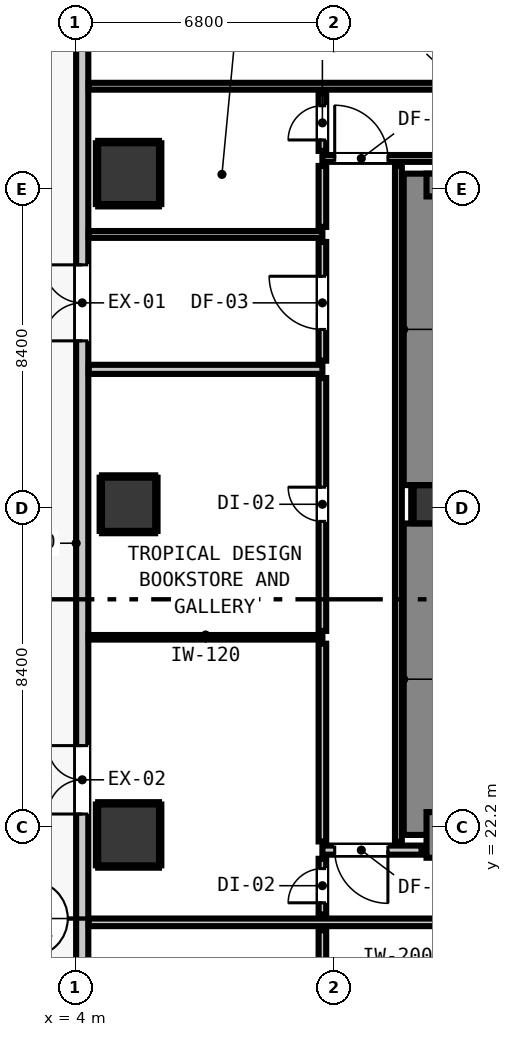
"""IFC4 building model, lengths in metres.
Left out: names, types, materials, properties, quantities, classifications, styles, units other than length and angle.
Written with IfcOpenShell. Run it as: python <this file> out.ifc"""

import sys

from ifc_helpers import new_model, si_unit, direction, frame, frame_2d, origin, origin_2d, place, context, subcontext, project, spatial, rectangle, extrude, element, fill, save


model = new_model("IFC4")
c1 = context("Model", 3, precision=1e-05, world=origin(), true_north=direction((0.0, 1.0)))
c2 = subcontext(c1, "Body", "Model", "MODEL_VIEW")
j1 = project(units=[si_unit("LENGTHUNIT", "METRE"), si_unit("PLANEANGLEUNIT", "RADIAN")], contexts=[c1])
p1 = place(None, origin())
s1 = spatial("IfcSite", under=j1, at=p1, CompositionType="ELEMENT")
p2 = place(p1, origin())
s2 = spatial("IfcBuilding", under=s1, at=p2, CompositionType="ELEMENT")
p3 = place(p2, origin())
s3 = spatial("IfcBuildingStorey", under=s2, at=p3, CompositionType="ELEMENT", Elevation=0.0)
p4 = place(p3, frame((13.4, 30.7, 0.0), z_axis=(0.0, 0.0, 1.0), x_axis=(1.0, 0.0, 0.0)))
e1 = element("IfcColumn", 1, at=p4, inside=s3, PredefinedType="COLUMN", context=c2, shape_type="SweptSolid", body=[
    extrude(rectangle(XDim=1.0, YDim=1.0, at=origin_2d()), origin(), (0.0, 0.0, 1.0), 5.2),
])
p5 = place(p3, frame((13.24, 22.0, 0.0), z_axis=(0.0, 0.0, 1.0), x_axis=(0.0, 1.0, 0.0)))
e2 = element("IfcWall", 2, at=p5, inside=s3, PredefinedType="SHEAR", context=c2, shape_type="SweptSolid", body=[
    extrude(rectangle(XDim=8.195, YDim=1.2, at=frame_2d((4.098, 0.0))), origin(), (0.0, 0.0, 1.0), 5.2),
])
p6 = place(p3, frame((13.24, 31.205, 0.0), z_axis=(0.0, 0.0, 1.0), x_axis=(0.0, 1.0, 0.0)))
e3 = element("IfcWall", 3, at=p6, inside=s3, PredefinedType="SHEAR", context=c2, shape_type="SweptSolid", body=[
    extrude(rectangle(XDim=8.195, YDim=1.2, at=frame_2d((4.097, 0.0))), origin(), (0.0, 0.0, 1.0), 5.2),
])
p7 = place(p3, frame((13.24, 22.0, 0.0), z_axis=(0.0, 0.0, 1.0), x_axis=(1.0, 0.0, 0.0)))
e4 = element("IfcWall", 4, at=p7, inside=s3, PredefinedType="SHEAR", context=c2, shape_type="SweptSolid", body=[
    extrude(rectangle(XDim=4.08, YDim=1.2, at=frame_2d((2.04, 0.0))), origin(), (0.0, 0.0, 1.0), 5.2),
])
p8 = place(p3, frame((13.24, 39.1, 0.0), z_axis=(0.0, 0.0, 1.0), x_axis=(1.0, 0.0, 0.0)))
e5 = element("IfcWall", 5, at=p8, inside=s3, PredefinedType="SHEAR", context=c2, shape_type="SweptSolid", body=[
    extrude(rectangle(XDim=4.08, YDim=0.6, at=frame_2d((2.04, 0.0))), origin(), (0.0, 0.0, 1.0), 5.2),
])
p9 = place(p3, frame((5.4, 22.0, 0.0), z_axis=(0.0, 0.0, 1.0), x_axis=(1.0, 0.0, 0.0)))
e6 = element("IfcColumn", 6, at=p9, inside=s3, PredefinedType="COLUMN", context=c2, shape_type="SweptSolid", body=[
    extrude(rectangle(XDim=1.6, YDim=1.6, at=origin_2d()), origin(), (0.0, 0.0, 1.0), 5.2),
])
p10 = place(p3, frame((5.4, 30.7, 0.0), z_axis=(0.0, 0.0, 1.0), x_axis=(1.0, 0.0, 0.0)))
e7 = element("IfcColumn", 7, at=p10, inside=s3, PredefinedType="COLUMN", context=c2, shape_type="SweptSolid", body=[
    extrude(rectangle(XDim=1.4, YDim=1.4, at=origin_2d()), origin(), (0.0, 0.0, 1.0), 5.2),
])
p11 = place(p3, frame((5.4, 39.4, 0.0), z_axis=(0.0, 0.0, 1.0), x_axis=(1.0, 0.0, 0.0)))
e8 = element("IfcColumn", 8, at=p11, inside=s3, PredefinedType="COLUMN", context=c2, shape_type="SweptSolid", body=[
    extrude(rectangle(XDim=1.6, YDim=1.6, at=origin_2d()), origin(), (0.0, 0.0, 1.0), 5.2),
])
p12 = place(p3, frame((4.18, 12.68, 0.0), z_axis=(0.0, 0.0, 1.0), x_axis=(0.0, 1.0, 0.0)))
e9 = element("IfcWall", 9, at=p12, inside=s3, PredefinedType="STANDARD", context=c2, shape_type="SweptSolid", body=[
    extrude(rectangle(XDim=35.84, YDim=0.32, at=frame_2d((17.92, 0.0))), origin(), (0.0, 0.0, 1.0), 4.92),
])
p13 = place(p12, frame((9.87, 0.0, 0.0)))
e10 = element("IfcOpeningElement", 10, at=p13, cuts=e9, PredefinedType="OPENING", context=c2, shape_type="SweptSolid", body=[
    extrude(rectangle(XDim=1.8, YDim=2.4, at=frame_2d((0.9, 1.2))), frame((0.0, 0.17, 0.0), z_axis=(0.0, -1.0, 0.0), x_axis=(1.0, 0.0, 0.0)), (0.0, 0.0, 1.0), 0.34),
])
p14 = place(p12, frame((22.32, 0.0, 0.0)))
e11 = element("IfcOpeningElement", 11, at=p14, cuts=e9, PredefinedType="OPENING", context=c2, shape_type="SweptSolid", body=[
    extrude(rectangle(XDim=2.0, YDim=2.4, at=frame_2d((1.0, 1.2))), frame((0.0, 0.17, 0.0), z_axis=(0.0, -1.0, 0.0), x_axis=(1.0, 0.0, 0.0)), (0.0, 0.0, 1.0), 0.34),
])
p15 = place(p12, frame((30.72, 0.0, 0.0)))
e12 = element("IfcOpeningElement", 12, at=p15, cuts=e9, PredefinedType="OPENING", context=c2, shape_type="SweptSolid", body=[
    extrude(rectangle(XDim=3.6, YDim=2.8, at=frame_2d((1.8, 1.4))), frame((0.0, 0.17, 0.0), z_axis=(0.0, -1.0, 0.0), x_axis=(1.0, 0.0, 0.0)), (0.0, 0.0, 1.0), 0.34),
])
p16 = place(p12, frame((2.6, 0.0, 0.9)))
e13 = element("IfcOpeningElement", 13, at=p16, cuts=e9, PredefinedType="OPENING", context=c2, shape_type="SweptSolid", body=[
    extrude(rectangle(XDim=2.1, YDim=1.9, at=frame_2d((1.05, 0.95))), frame((0.0, 0.17, 0.0), z_axis=(0.0, -1.0, 0.0), x_axis=(1.0, 0.0, 0.0)), (0.0, 0.0, 1.0), 0.34),
])
p17 = place(p3, frame((13.11, 21.6, 0.0), z_axis=(0.0, 0.0, 1.0), x_axis=(-1.0, 0.0, 0.0)))
e14 = element("IfcWall", 14, at=p17, inside=s3, PredefinedType="PARTITIONING", context=c2, shape_type="SweptSolid", body=[
    extrude(rectangle(XDim=2.61, YDim=0.24, at=frame_2d((1.305, 0.0))), origin(), (0.0, 0.0, 1.0), 4.155),
])
p18 = place(p17, frame((0.886, 0.0, 0.0)))
e15 = element("IfcOpeningElement", 15, at=p18, cuts=e14, PredefinedType="OPENING", context=c2, shape_type="SweptSolid", body=[
    extrude(rectangle(XDim=1.4, YDim=2.15, at=frame_2d((0.7, 1.075))), frame((0.0, 0.13, 0.0), z_axis=(0.0, -1.0, 0.0), x_axis=(1.0, 0.0, 0.0)), (0.0, 0.0, 1.0), 0.26),
])
p19 = place(p3, frame((4.352, 34.25, 0.0), z_axis=(0.0, 0.0, 1.0), x_axis=(1.0, 0.0, 0.0)))
e16 = element("IfcWall", 16, at=p19, inside=s3, PredefinedType="PARTITIONING", context=c2, shape_type="SweptSolid", body=[
    extrude(rectangle(XDim=6.148, YDim=0.24, at=frame_2d((3.074, 0.0))), origin(), (0.0, 0.0, 1.0), 4.92),
])
p20 = place(p3, frame((4.352, 19.7, 0.0), z_axis=(0.0, 0.0, 1.0), x_axis=(1.0, 0.0, 0.0)))
e17 = element("IfcWall", 17, at=p20, inside=s3, PredefinedType="PARTITIONING", context=c2, shape_type="SweptSolid", body=[
    extrude(rectangle(XDim=43.296, YDim=0.2, at=frame_2d((21.648, 0.0))), origin(), (0.0, 0.0, 1.0), 4.92),
])
p21 = place(p20, frame((19.823, 0.0, 0.0)))
e18 = element("IfcOpeningElement", 18, at=p21, cuts=e17, PredefinedType="OPENING", context=c2, shape_type="SweptSolid", body=[
    extrude(rectangle(XDim=1.4, YDim=2.15, at=frame_2d((0.7, 1.075))), frame((0.0, 0.11, 0.0), z_axis=(0.0, -1.0, 0.0), x_axis=(1.0, 0.0, 0.0)), (0.0, 0.0, 1.0), 0.22),
])
p22 = place(p20, frame((36.848, 0.0, 0.0)))
e19 = element("IfcOpeningElement", 19, at=p22, cuts=e17, PredefinedType="OPENING", context=c2, shape_type="SweptSolid", body=[
    extrude(rectangle(XDim=1.4, YDim=2.15, at=frame_2d((0.7, 1.075))), frame((0.0, 0.11, 0.0), z_axis=(0.0, -1.0, 0.0), x_axis=(1.0, 0.0, 0.0)), (0.0, 0.0, 1.0), 0.22),
])
p23 = place(p3, frame((4.352, 37.8, 0.0), z_axis=(0.0, 0.0, 1.0), x_axis=(1.0, 0.0, 0.0)))
e20 = element("IfcWall", 20, at=p23, inside=s3, PredefinedType="PARTITIONING", context=c2, shape_type="SweptSolid", body=[
    extrude(rectangle(XDim=6.148, YDim=0.18, at=frame_2d((3.074, 0.0))), origin(), (0.0, 0.0, 1.0), 4.92),
])
p24 = place(p3, frame((10.5, 39.8, 0.0), z_axis=(0.0, 0.0, 1.0), x_axis=(1.0, 0.0, 0.0)))
e21 = element("IfcWall", 21, at=p24, inside=s3, PredefinedType="PARTITIONING", context=c2, shape_type="SweptSolid", body=[
    extrude(rectangle(XDim=9.698, YDim=0.18, at=frame_2d((4.849, 0.0))), origin(), (0.0, 0.0, 1.0), 4.155),
])
p25 = place(p24, frame((6.935, 0.0, 0.0)))
e22 = element("IfcOpeningElement", 22, at=p25, cuts=e21, PredefinedType="OPENING", context=c2, shape_type="SweptSolid", body=[
    extrude(rectangle(XDim=1.4, YDim=2.15, at=frame_2d((0.7, 1.075))), frame((0.0, 0.1, 0.0), z_axis=(0.0, -1.0, 0.0), x_axis=(1.0, 0.0, 0.0)), (0.0, 0.0, 1.0), 0.2),
])
p26 = place(p24, frame((0.324, 0.0, 0.0)))
e23 = element("IfcOpeningElement", 23, at=p26, cuts=e21, PredefinedType="OPENING", context=c2, shape_type="SweptSolid", body=[
    extrude(rectangle(XDim=1.4, YDim=2.15, at=frame_2d((0.7, 1.075))), frame((0.0, 0.1, 0.0), z_axis=(0.0, -1.0, 0.0), x_axis=(1.0, 0.0, 0.0)), (0.0, 0.0, 1.0), 0.2),
])
p27 = place(p3, frame((4.352, 41.7, 0.0), z_axis=(0.0, 0.0, 1.0), x_axis=(1.0, 0.0, 0.0)))
e24 = element("IfcWall", 24, at=p27, inside=s3, PredefinedType="PARTITIONING", context=c2, shape_type="SweptSolid", body=[
    extrude(rectangle(XDim=34.848, YDim=0.18, at=frame_2d((17.424, 0.0))), origin(), (0.0, 0.0, 1.0), 4.92),
])
p28 = place(p27, frame((18.448, 0.0, 0.0)))
e25 = element("IfcOpeningElement", 25, at=p28, cuts=e24, PredefinedType="OPENING", context=c2, shape_type="SweptSolid", body=[
    extrude(rectangle(XDim=1.4, YDim=2.15, at=frame_2d((0.7, 1.075))), frame((0.0, 0.1, 0.0), z_axis=(0.0, -1.0, 0.0), x_axis=(1.0, 0.0, 0.0)), (0.0, 0.0, 1.0), 0.2),
])
p29 = place(p27, frame((9.258, 0.0, 0.0)))
e26 = element("IfcOpeningElement", 26, at=p29, cuts=e24, PredefinedType="OPENING", context=c2, shape_type="SweptSolid", body=[
    extrude(rectangle(XDim=0.9, YDim=2.1, at=frame_2d((0.45, 1.05))), frame((0.0, 0.1, 0.0), z_axis=(0.0, -1.0, 0.0), x_axis=(1.0, 0.0, 0.0)), (0.0, 0.0, 1.0), 0.2),
])
p30 = place(p27, frame((14.898, 0.0, 0.0)))
e27 = element("IfcOpeningElement", 27, at=p30, cuts=e24, PredefinedType="OPENING", context=c2, shape_type="SweptSolid", body=[
    extrude(rectangle(XDim=0.9, YDim=2.1, at=frame_2d((0.45, 1.05))), frame((0.0, 0.1, 0.0), z_axis=(0.0, -1.0, 0.0), x_axis=(1.0, 0.0, 0.0)), (0.0, 0.0, 1.0), 0.2),
])
p31 = place(p27, frame((22.818, 0.0, 0.0)))
e28 = element("IfcOpeningElement", 28, at=p31, cuts=e24, PredefinedType="OPENING", context=c2, shape_type="SweptSolid", body=[
    extrude(rectangle(XDim=0.86, YDim=2.02, at=frame_2d((0.43, 1.01))), frame((0.0, 0.1, 0.0), z_axis=(0.0, -1.0, 0.0), x_axis=(1.0, 0.0, 0.0)), (0.0, 0.0, 1.0), 0.2),
])
p32 = place(p27, frame((27.518, 0.0, 0.0)))
e29 = element("IfcOpeningElement", 29, at=p32, cuts=e24, PredefinedType="OPENING", context=c2, shape_type="SweptSolid", body=[
    extrude(rectangle(XDim=0.86, YDim=2.02, at=frame_2d((0.43, 1.01))), frame((0.0, 0.1, 0.0), z_axis=(0.0, -1.0, 0.0), x_axis=(1.0, 0.0, 0.0)), (0.0, 0.0, 1.0), 0.2),
])
p33 = place(p27, frame((32.049, 0.0, 0.0)))
e30 = element("IfcOpeningElement", 30, at=p33, cuts=e24, PredefinedType="OPENING", context=c2, shape_type="SweptSolid", body=[
    extrude(rectangle(XDim=0.95, YDim=2.1, at=frame_2d((0.475, 1.05))), frame((0.0, 0.1, 0.0), z_axis=(0.0, -1.0, 0.0), x_axis=(1.0, 0.0, 0.0)), (0.0, 0.0, 1.0), 0.2),
])
p34 = place(p3, frame((4.352, 27.2, 0.0), z_axis=(0.0, 0.0, 1.0), x_axis=(1.0, 0.0, 0.0)))
e31 = element("IfcWall", 31, at=p34, inside=s3, PredefinedType="PARTITIONING", context=c2, shape_type="SweptSolid", body=[
    extrude(rectangle(XDim=6.148, YDim=0.12, at=frame_2d((3.074, 0.0))), origin(), (0.0, 0.0, 1.0), 4.92),
])
p35 = place(p3, frame((10.5, 12.298, 0.0), z_axis=(0.0, 0.0, 1.0), x_axis=(0.0, 1.0, 0.0)))
e32 = element("IfcWall", 32, at=p35, inside=s3, PredefinedType="PARTITIONING", context=c2, shape_type="SweptSolid", body=[
    extrude(rectangle(XDim=7.194, YDim=0.2, at=frame_2d((3.597, 0.0))), origin(), (0.0, 0.0, 1.0), 4.92),
])
p36 = place(p35, frame((2.838, 0.0, 0.0)))
e33 = element("IfcOpeningElement", 33, at=p36, cuts=e32, PredefinedType="OPENING", context=c2, shape_type="SweptSolid", body=[
    extrude(rectangle(XDim=1.5, YDim=2.15, at=frame_2d((0.75, 1.075))), frame((0.0, 0.11, 0.0), z_axis=(0.0, -1.0, 0.0), x_axis=(1.0, 0.0, 0.0)), (0.0, 0.0, 1.0), 0.22),
])
p37 = place(p3, frame((10.5, 19.908, 0.0), z_axis=(0.0, 0.0, 1.0), x_axis=(0.0, 1.0, 0.0)))
e34 = element("IfcWall", 34, at=p37, inside=s3, PredefinedType="PARTITIONING", context=c2, shape_type="SweptSolid", body=[
    extrude(rectangle(XDim=1.464, YDim=0.2, at=frame_2d((0.732, 0.0))), origin(), (0.0, 0.0, 1.0), 4.92),
])
p38 = place(p37, frame((0.306, 0.0, 0.0)))
e35 = element("IfcOpeningElement", 35, at=p38, cuts=e34, PredefinedType="OPENING", context=c2, shape_type="SweptSolid", body=[
    extrude(rectangle(XDim=0.9, YDim=2.1, at=frame_2d((0.45, 1.05))), frame((0.0, 0.11, 0.0), z_axis=(0.0, -1.0, 0.0), x_axis=(1.0, 0.0, 0.0)), (0.0, 0.0, 1.0), 0.22),
])
p39 = place(p3, frame((10.5, 21.828, 0.0), z_axis=(0.0, 0.0, 1.0), x_axis=(0.0, 1.0, 0.0)))
e36 = element("IfcWall", 36, at=p39, inside=s3, PredefinedType="PARTITIONING", context=c2, shape_type="SweptSolid", body=[
    extrude(rectangle(XDim=5.204, YDim=0.2, at=frame_2d((2.602, 0.0))), origin(), (0.0, 0.0, 1.0), 4.92),
])
p40 = place(p3, frame((10.5, 27.368, 0.0), z_axis=(0.0, 0.0, 1.0), x_axis=(0.0, 1.0, 0.0)))
e37 = element("IfcWall", 37, at=p40, inside=s3, PredefinedType="PARTITIONING", context=c2, shape_type="SweptSolid", body=[
    extrude(rectangle(XDim=6.654, YDim=0.2, at=frame_2d((3.327, 0.0))), origin(), (0.0, 0.0, 1.0), 4.92),
])
p41 = place(p40, frame((2.882, 0.0, 0.0)))
e38 = element("IfcOpeningElement", 38, at=p41, cuts=e37, PredefinedType="OPENING", context=c2, shape_type="SweptSolid", body=[
    extrude(rectangle(XDim=0.9, YDim=2.1, at=frame_2d((0.45, 1.05))), frame((0.0, 0.11, 0.0), z_axis=(0.0, -1.0, 0.0), x_axis=(1.0, 0.0, 0.0)), (0.0, 0.0, 1.0), 0.22),
])
p42 = place(p3, frame((10.5, 34.478, 0.0), z_axis=(0.0, 0.0, 1.0), x_axis=(0.0, 1.0, 0.0)))
e39 = element("IfcWall", 39, at=p42, inside=s3, PredefinedType="PARTITIONING", context=c2, shape_type="SweptSolid", body=[
    extrude(rectangle(XDim=3.124, YDim=0.2, at=frame_2d((1.562, 0.0))), origin(), (0.0, 0.0, 1.0), 4.92),
])
p43 = place(p42, frame((0.822, 0.0, 0.0)))
e40 = element("IfcOpeningElement", 40, at=p43, cuts=e39, PredefinedType="OPENING", context=c2, shape_type="SweptSolid", body=[
    extrude(rectangle(XDim=1.4, YDim=2.15, at=frame_2d((0.7, 1.075))), frame((0.0, 0.11, 0.0), z_axis=(0.0, -1.0, 0.0), x_axis=(1.0, 0.0, 0.0)), (0.0, 0.0, 1.0), 0.22),
])
p44 = place(p3, frame((10.5, 37.998, 0.0), z_axis=(0.0, 0.0, 1.0), x_axis=(0.0, 1.0, 0.0)))
e41 = element("IfcWall", 41, at=p44, inside=s3, PredefinedType="PARTITIONING", context=c2, shape_type="SweptSolid", body=[
    extrude(rectangle(XDim=1.604, YDim=0.2, at=frame_2d((0.802, 0.0))), origin(), (0.0, 0.0, 1.0), 4.92),
])
p45 = place(p3, frame((10.5, 39.998, 0.0), z_axis=(0.0, 0.0, 1.0), x_axis=(0.0, 1.0, 0.0)))
e42 = element("IfcWall", 42, at=p45, inside=s3, PredefinedType="PARTITIONING", context=c2, shape_type="SweptSolid", body=[
    extrude(rectangle(XDim=1.504, YDim=0.2, at=frame_2d((0.752, 0.0))), origin(), (0.0, 0.0, 1.0), 4.92),
])
p46 = place(p45, frame((0.288, 0.0, 0.0)))
e43 = element("IfcOpeningElement", 43, at=p46, cuts=e42, PredefinedType="OPENING", context=c2, shape_type="SweptSolid", body=[
    extrude(rectangle(XDim=0.9, YDim=2.1, at=frame_2d((0.45, 1.05))), frame((0.0, 0.11, 0.0), z_axis=(0.0, -1.0, 0.0), x_axis=(1.0, 0.0, 0.0)), (0.0, 0.0, 1.0), 0.22),
])
p47 = place(p3, frame((12.5, 21.818, 0.0), z_axis=(0.0, 0.0, 1.0), x_axis=(0.0, 1.0, 0.0)))
e44 = element("IfcWall", 44, at=p47, inside=s3, PredefinedType="PARTITIONING", context=c2, shape_type="SweptSolid", body=[
    extrude(rectangle(XDim=17.794, YDim=0.18, at=frame_2d((8.897, 0.0))), origin(), (0.0, 0.0, 1.0), 4.92),
])
p48 = place(p3, frame((12.868, 30.21, 0.0), z_axis=(0.0, 0.0, 1.0), x_axis=(0.0, 1.0, 0.0)))
e45 = element("IfcWall", 45, at=p48, inside=s3, PredefinedType="PARTITIONING", context=c2, shape_type="SweptSolid", body=[
    extrude(rectangle(XDim=0.98, YDim=0.06, at=frame_2d((0.49, 0.0))), origin(), (0.0, 0.0, 1.0), 1.45),
])
for number, where, z_axis, x_axis in (
    (46, (4.6, 21.168, 0.0), (0.0, 0.0, 1.0), (1.0, 0.0, 0.0)),
    (47, (4.6, 22.832, 0.0), (0.0, 0.0, 1.0), (1.0, 0.0, 0.0)),
):
    element("IfcWall", number, at=place(p3, frame(where, z_axis=z_axis, x_axis=x_axis)), inside=s3, PredefinedType="PARTITIONING", context=c2, shape_type="SweptSolid", body=[
        extrude(rectangle(XDim=1.6, YDim=0.06, at=frame_2d((0.8, 0.0))), origin(), (0.0, 0.0, 1.0), 1.45),
    ])
for number, where, z_axis, x_axis in (
    (48, (4.568, 21.2, 0.0), (0.0, 0.0, 1.0), (0.0, 1.0, 0.0)),
    (49, (6.232, 21.2, 0.0), (0.0, 0.0, 1.0), (0.0, 1.0, 0.0)),
):
    element("IfcWall", number, at=place(p3, frame(where, z_axis=z_axis, x_axis=x_axis)), inside=s3, PredefinedType="PARTITIONING", context=c2, shape_type="SweptSolid", body=[
        extrude(rectangle(XDim=1.6, YDim=0.06, at=frame_2d((0.8, 0.0))), origin(), (0.0, 0.0, 1.0), 1.45),
    ])
for number, where, z_axis, x_axis in (
    (50, (4.7, 29.968, 0.0), (0.0, 0.0, 1.0), (1.0, 0.0, 0.0)),
    (51, (4.7, 31.432, 0.0), (0.0, 0.0, 1.0), (1.0, 0.0, 0.0)),
):
    element("IfcWall", number, at=place(p3, frame(where, z_axis=z_axis, x_axis=x_axis)), inside=s3, PredefinedType="PARTITIONING", context=c2, shape_type="SweptSolid", body=[
        extrude(rectangle(XDim=1.4, YDim=0.06, at=frame_2d((0.7, 0.0))), origin(), (0.0, 0.0, 1.0), 1.45),
    ])
for number, where, z_axis, x_axis in (
    (52, (4.668, 30.0, 0.0), (0.0, 0.0, 1.0), (0.0, 1.0, 0.0)),
    (53, (6.132, 30.0, 0.0), (0.0, 0.0, 1.0), (0.0, 1.0, 0.0)),
):
    element("IfcWall", number, at=place(p3, frame(where, z_axis=z_axis, x_axis=x_axis)), inside=s3, PredefinedType="PARTITIONING", context=c2, shape_type="SweptSolid", body=[
        extrude(rectangle(XDim=1.4, YDim=0.06, at=frame_2d((0.7, 0.0))), origin(), (0.0, 0.0, 1.0), 1.45),
    ])
for number, where, z_axis, x_axis in (
    (54, (4.6, 38.568, 0.0), (0.0, 0.0, 1.0), (1.0, 0.0, 0.0)),
    (55, (4.6, 40.232, 0.0), (0.0, 0.0, 1.0), (1.0, 0.0, 0.0)),
    (56, (4.568, 38.6, 0.0), (0.0, 0.0, 1.0), (0.0, 1.0, 0.0)),
    (57, (6.232, 38.6, 0.0), (0.0, 0.0, 1.0), (0.0, 1.0, 0.0)),
):
    element("IfcWall", number, at=place(p3, frame(where, z_axis=z_axis, x_axis=x_axis)), inside=s3, PredefinedType="PARTITIONING", context=c2, shape_type="SweptSolid", body=[
        extrude(rectangle(XDim=1.6, YDim=0.06, at=frame_2d((0.8, 0.0))), origin(), (0.0, 0.0, 1.0), 1.45),
    ])
p49 = place(p13, origin())
e58 = element("IfcDoor", 58, at=p49, inside=s3, OperationType="DOUBLE_DOOR_SINGLE_SWING", PredefinedType="DOOR", context=c2, shape_type="SweptSolid", body=[
    extrude(rectangle(XDim=1.8, YDim=2.4, at=frame_2d((0.9, 1.2))), frame((0.0, 0.025, 0.0), z_axis=(0.0, -1.0, 0.0), x_axis=(1.0, 0.0, 0.0)), (0.0, 0.0, 1.0), 0.05),
])
fill(e10, e58)
p50 = place(p14, origin())
e59 = element("IfcDoor", 59, at=p50, inside=s3, OperationType="DOUBLE_DOOR_SINGLE_SWING", PredefinedType="DOOR", context=c2, shape_type="SweptSolid", body=[
    extrude(rectangle(XDim=2.0, YDim=2.4, at=frame_2d((1.0, 1.2))), frame((0.0, 0.025, 0.0), z_axis=(0.0, -1.0, 0.0), x_axis=(1.0, 0.0, 0.0)), (0.0, 0.0, 1.0), 0.05),
])
fill(e11, e59)
p51 = place(p18, origin())
e60 = element("IfcDoor", 60, at=p51, inside=s3, OperationType="SINGLE_SWING_LEFT", PredefinedType="DOOR", context=c2, shape_type="SweptSolid", body=[
    extrude(rectangle(XDim=1.4, YDim=2.15, at=frame_2d((0.7, 1.075))), frame((0.0, 0.025, 0.0), z_axis=(0.0, -1.0, 0.0), x_axis=(1.0, 0.0, 0.0)), (0.0, 0.0, 1.0), 0.05),
])
fill(e15, e60)
p52 = place(p26, origin())
e61 = element("IfcDoor", 61, at=p52, inside=s3, OperationType="SINGLE_SWING_LEFT", PredefinedType="DOOR", context=c2, shape_type="SweptSolid", body=[
    extrude(rectangle(XDim=1.4, YDim=2.15, at=frame_2d((0.7, 1.075))), frame((0.0, 0.025, 0.0), z_axis=(0.0, -1.0, 0.0), x_axis=(1.0, 0.0, 0.0)), (0.0, 0.0, 1.0), 0.05),
])
fill(e23, e61)
p53 = place(p43, origin())
e62 = element("IfcDoor", 62, at=p53, inside=s3, OperationType="SINGLE_SWING_RIGHT", PredefinedType="DOOR", context=c2, shape_type="SweptSolid", body=[
    extrude(rectangle(XDim=1.4, YDim=2.15, at=frame_2d((0.7, 1.075))), frame((0.0, 0.025, 0.0), z_axis=(0.0, -1.0, 0.0), x_axis=(1.0, 0.0, 0.0)), (0.0, 0.0, 1.0), 0.05),
])
fill(e40, e62)
p54 = place(p38, origin())
e63 = element("IfcDoor", 63, at=p54, inside=s3, OperationType="SINGLE_SWING_LEFT", PredefinedType="DOOR", context=c2, shape_type="SweptSolid", body=[
    extrude(rectangle(XDim=0.9, YDim=2.1, at=frame_2d((0.45, 1.05))), frame((0.0, 0.025, 0.0), z_axis=(0.0, -1.0, 0.0), x_axis=(1.0, 0.0, 0.0)), (0.0, 0.0, 1.0), 0.05),
])
fill(e35, e63)
p55 = place(p41, origin())
e64 = element("IfcDoor", 64, at=p55, inside=s3, OperationType="SINGLE_SWING_RIGHT", PredefinedType="DOOR", context=c2, shape_type="SweptSolid", body=[
    extrude(rectangle(XDim=0.9, YDim=2.1, at=frame_2d((0.45, 1.05))), frame((0.0, 0.025, 0.0), z_axis=(0.0, -1.0, 0.0), x_axis=(1.0, 0.0, 0.0)), (0.0, 0.0, 1.0), 0.05),
])
fill(e38, e64)
p56 = place(p46, origin())
e65 = element("IfcDoor", 65, at=p56, inside=s3, OperationType="SINGLE_SWING_LEFT", PredefinedType="DOOR", context=c2, shape_type="SweptSolid", body=[
    extrude(rectangle(XDim=0.9, YDim=2.1, at=frame_2d((0.45, 1.05))), frame((0.0, 0.025, 0.0), z_axis=(0.0, -1.0, 0.0), x_axis=(1.0, 0.0, 0.0)), (0.0, 0.0, 1.0), 0.05),
])
fill(e43, e65)
save(model, sys.argv[1])
